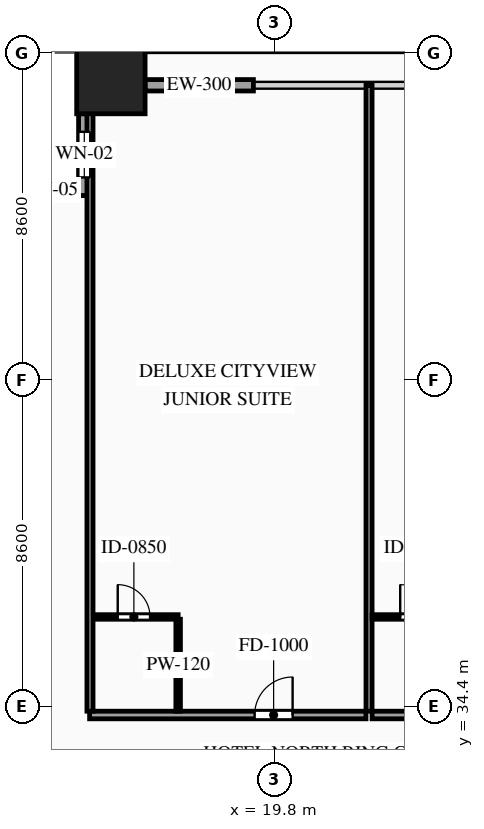
"""IFC4 building model, lengths in metres.
Left out: names, types, materials, properties, quantities, classifications, styles, units other than length and angle.
Written with IfcOpenShell. Run it as: python <this file> out.ifc"""

import sys

from ifc_helpers import new_model, si_unit, direction, frame, frame_2d, origin, origin_2d, place, context, subcontext, project, spatial, rectangle, hollow_rectangle, extrude, source, transform, mapped, element, fill, save


model = new_model("IFC4")
c1 = context("Model", 3, precision=1e-05, world=origin(), true_north=direction((0.0, 1.0)))
c2 = subcontext(c1, "Body", "Model", "MODEL_VIEW")
j1 = project(units=[si_unit("LENGTHUNIT", "METRE"), si_unit("PLANEANGLEUNIT", "RADIAN")], contexts=[c1])
p1 = place(None, origin())
s1 = spatial("IfcSite", under=j1, at=p1, CompositionType="ELEMENT")
p2 = place(p1, origin())
s2 = spatial("IfcBuilding", under=s1, at=p2, CompositionType="ELEMENT")
p3 = place(p2, frame((0.0, 0.0, 30.6)))
s3 = spatial("IfcBuildingStorey", under=s2, at=p3, CompositionType="ELEMENT", Elevation=30.6)
m1 = source(origin(), c2, "Body", "SweptSolid", [
    extrude(hollow_rectangle(XDim=1.8, YDim=1.8, WallThickness=0.08, at=origin_2d()), origin(), (0.0, 0.0, 1.0), 3.6),
])
p4 = place(p3, frame((15.5, 50.9, 0.0), z_axis=(0.0, 0.0, 1.0), x_axis=(1.0, 0.0, 0.0)))
e1 = element("IfcColumn", 1, at=p4, inside=s3, PredefinedType="COLUMN", context=c2, shape_type="MappedRepresentation", body=[
    mapped(m1, transform((0.0, 0.0, 0.0), scale=1.0)),
])
p5 = place(p3, frame((14.95, 48.0, 0.0), z_axis=(0.0, 0.0, 1.0), x_axis=(-1.0, 0.0, 0.0)))
e2 = element("IfcWall", 2, at=p5, inside=s3, PredefinedType="SOLIDWALL", context=c2, shape_type="SweptSolid", body=[
    extrude(rectangle(XDim=2.15, YDim=0.3, at=frame_2d((1.075, 0.0))), origin(), (0.0, 0.0, 1.0), 3.38),
])
p6 = place(p5, frame((0.625, 0.0, 0.85)))
e3 = element("IfcOpeningElement", 3, at=p6, cuts=e2, PredefinedType="OPENING", context=c2, shape_type="SweptSolid", body=[
    extrude(rectangle(XDim=0.9, YDim=1.5, at=frame_2d((0.45, 0.75))), frame((0.0, 0.165, 0.0), z_axis=(0.0, -1.0, 0.0), x_axis=(1.0, 0.0, 0.0)), (0.0, 0.0, 1.0), 0.33),
])
p7 = place(p3, frame((14.8, 50.0, 0.0), z_axis=(0.0, 0.0, 1.0), x_axis=(0.0, -1.0, 0.0)))
e4 = element("IfcWall", 4, at=p7, inside=s3, PredefinedType="SOLIDWALL", context=c2, shape_type="SweptSolid", body=[
    extrude(rectangle(XDim=2.15, YDim=0.3, at=frame_2d((1.075, 0.0))), origin(), (0.0, 0.0, 1.0), 3.38),
])
p8 = place(p7, frame((0.475, 0.0, 0.85)))
e5 = element("IfcOpeningElement", 5, at=p8, cuts=e4, PredefinedType="OPENING", context=c2, shape_type="SweptSolid", body=[
    extrude(rectangle(XDim=1.2, YDim=2.1, at=frame_2d((0.6, 1.05))), frame((0.0, 0.165, 0.0), z_axis=(0.0, -1.0, 0.0), x_axis=(1.0, 0.0, 0.0)), (0.0, 0.0, 1.0), 0.33),
])
m2 = source(origin(), c2, "Body", "SweptSolid", [
    extrude(rectangle(XDim=2.85, YDim=0.3, at=frame_2d((1.425, 0.0))), origin(), (0.0, 0.0, 1.0), 2.775),
])
p9 = place(p3, frame((16.4, 50.75, 0.0), z_axis=(0.0, 0.0, 1.0), x_axis=(1.0, 0.0, 0.0)))
e6 = element("IfcWall", 6, at=p9, inside=s3, PredefinedType="SOLIDWALL", context=c2, shape_type="MappedRepresentation", body=[
    mapped(m2, transform((0.0, 0.0, 0.0), scale=1.0)),
])
p10 = place(p3, frame((14.94, 34.18, 0.0), z_axis=(0.0, 0.0, 1.0), x_axis=(1.0, 0.0, 0.0)))
e7 = element("IfcWall", 7, at=p10, inside=s3, PredefinedType="PARTITIONING", context=c2, shape_type="SweptSolid", body=[
    extrude(rectangle(XDim=7.273, YDim=0.2, at=frame_2d((3.636, 0.0))), origin(), (0.0, 0.0, 1.0), 3.38),
])
p11 = place(p10, frame((4.342, 0.0, 0.0)))
e8 = element("IfcOpeningElement", 8, at=p11, cuts=e7, PredefinedType="OPENING", context=c2, shape_type="SweptSolid", body=[
    extrude(rectangle(XDim=1.0, YDim=2.2, at=frame_2d((0.5, 1.1))), frame((0.0, 0.115, 0.0), z_axis=(0.0, -1.0, 0.0), x_axis=(1.0, 0.0, 0.0)), (0.0, 0.0, 1.0), 0.23),
])
m3 = source(origin(), c2, "Body", "SweptSolid", [
    extrude(rectangle(XDim=16.47, YDim=0.16, at=frame_2d((8.235, 0.0))), origin(), (0.0, 0.0, 1.0), 3.38),
])
p12 = place(p3, frame((22.293, 34.28, 0.0), z_axis=(0.0, 0.0, 1.0), x_axis=(0.0, 1.0, 0.0)))
e9 = element("IfcWall", 9, at=p12, inside=s3, PredefinedType="PARTITIONING", context=c2, shape_type="MappedRepresentation", body=[
    mapped(m3, transform((0.0, 0.0, 0.0), scale=1.0)),
])
p13 = place(p3, frame((14.94, 36.76, 0.0), z_axis=(0.0, 0.0, 1.0), x_axis=(1.0, 0.0, 0.0)))
e10 = element("IfcWall", 10, at=p13, inside=s3, PredefinedType="PARTITIONING", context=c2, shape_type="SweptSolid", body=[
    extrude(rectangle(XDim=2.33, YDim=0.12, at=frame_2d((1.165, 0.0))), origin(), (0.0, 0.0, 1.0), 3.38),
])
p14 = place(p13, frame((0.74, 0.0, 0.0)))
e11 = element("IfcOpeningElement", 11, at=p14, cuts=e10, PredefinedType="OPENING", context=c2, shape_type="SweptSolid", body=[
    extrude(rectangle(XDim=0.85, YDim=2.1, at=frame_2d((0.425, 1.05))), frame((0.0, 0.075, 0.0), z_axis=(0.0, -1.0, 0.0), x_axis=(1.0, 0.0, 0.0)), (0.0, 0.0, 1.0), 0.15),
])
m4 = source(origin(), c2, "Body", "SweptSolid", [
    extrude(rectangle(XDim=2.42, YDim=0.12, at=frame_2d((1.21, 0.0))), origin(), (0.0, 0.0, 1.0), 3.38),
])
p15 = place(p3, frame((17.27, 34.28, 0.0), z_axis=(0.0, 0.0, 1.0), x_axis=(0.0, 1.0, 0.0)))
e12 = element("IfcWall", 12, at=p15, inside=s3, PredefinedType="PARTITIONING", context=c2, shape_type="MappedRepresentation", body=[
    mapped(m4, transform((0.0, 0.0, 0.0), scale=1.0)),
])
p16 = place(p3, frame((22.373, 34.18, 0.0), z_axis=(0.0, 0.0, 1.0), x_axis=(1.0, 0.0, 0.0)))
e13 = element("IfcWall", 13, at=p16, inside=s3, PredefinedType="PARTITIONING", context=c2, shape_type="SweptSolid", body=[
    extrude(rectangle(XDim=7.194, YDim=0.2, at=frame_2d((3.597, 0.0))), origin(), (0.0, 0.0, 1.0), 3.38),
])
p17 = place(p16, frame((4.302, 0.0, 0.0)))
e14 = element("IfcOpeningElement", 14, at=p17, cuts=e13, PredefinedType="OPENING", context=c2, shape_type="SweptSolid", body=[
    extrude(rectangle(XDim=1.0, YDim=2.2, at=frame_2d((0.5, 1.1))), frame((0.0, 0.115, 0.0), z_axis=(0.0, -1.0, 0.0), x_axis=(1.0, 0.0, 0.0)), (0.0, 0.0, 1.0), 0.23),
])
p18 = place(p3, frame((22.373, 36.76, 0.0), z_axis=(0.0, 0.0, 1.0), x_axis=(1.0, 0.0, 0.0)))
e15 = element("IfcWall", 15, at=p18, inside=s3, PredefinedType="PARTITIONING", context=c2, shape_type="SweptSolid", body=[
    extrude(rectangle(XDim=2.33, YDim=0.12, at=frame_2d((1.165, 0.0))), origin(), (0.0, 0.0, 1.0), 3.38),
])
p19 = place(p18, frame((0.74, 0.0, 0.0)))
e16 = element("IfcOpeningElement", 16, at=p19, cuts=e15, PredefinedType="OPENING", context=c2, shape_type="SweptSolid", body=[
    extrude(rectangle(XDim=0.85, YDim=2.1, at=frame_2d((0.425, 1.05))), frame((0.0, 0.075, 0.0), z_axis=(0.0, -1.0, 0.0), x_axis=(1.0, 0.0, 0.0)), (0.0, 0.0, 1.0), 0.15),
])
m5 = source(origin(), c2, "Body", "SweptSolid", [
    extrude(rectangle(XDim=16.32, YDim=0.16, at=frame_2d((8.16, 0.0))), origin(), (0.0, 0.0, 1.0), 3.38),
])
p20 = place(p3, frame((14.95, 34.28, 0.0), z_axis=(0.0, 0.0, 1.0), x_axis=(0.0, 1.0, 0.0)))
e17 = element("IfcWall", 17, at=p20, inside=s3, PredefinedType="PARTITIONING", context=c2, shape_type="MappedRepresentation", body=[
    mapped(m5, transform((0.0, 0.0, 0.0), scale=1.0)),
])
m6 = source(origin(), c2, "Body", "SweptSolid", [
    extrude(rectangle(XDim=0.9, YDim=1.5, at=frame_2d((0.45, 0.75))), frame((0.0, 0.03, 0.0), z_axis=(0.0, -1.0, 0.0), x_axis=(1.0, 0.0, 0.0)), (0.0, 0.0, 1.0), 0.06),
])
p21 = place(p6, origin())
e18 = element("IfcWindow", 18, at=p21, inside=s3, PartitioningType="SINGLE_PANEL", PredefinedType="WINDOW", context=c2, shape_type="MappedRepresentation", body=[
    mapped(m6, transform((0.0, 0.0, 0.0), scale=1.0)),
])
fill(e3, e18)
m7 = source(origin(), c2, "Body", "SweptSolid", [
    extrude(rectangle(XDim=1.2, YDim=2.1, at=frame_2d((0.6, 1.05))), frame((0.0, 0.03, 0.0), z_axis=(0.0, -1.0, 0.0), x_axis=(1.0, 0.0, 0.0)), (0.0, 0.0, 1.0), 0.06),
])
p22 = place(p8, origin())
e19 = element("IfcWindow", 19, at=p22, inside=s3, PartitioningType="SINGLE_PANEL", PredefinedType="WINDOW", context=c2, shape_type="MappedRepresentation", body=[
    mapped(m7, transform((0.0, 0.0, 0.0), scale=1.0)),
])
fill(e5, e19)
m8 = source(origin(), c2, "Body", "SweptSolid", [
    extrude(rectangle(XDim=1.0, YDim=2.2, at=frame_2d((0.5, 1.1))), frame((0.0, 0.025, 0.0), z_axis=(0.0, -1.0, 0.0), x_axis=(1.0, 0.0, 0.0)), (0.0, 0.0, 1.0), 0.05),
])
p23 = place(p11, origin())
e20 = element("IfcDoor", 20, at=p23, inside=s3, OperationType="SINGLE_SWING_RIGHT", PredefinedType="DOOR", context=c2, shape_type="MappedRepresentation", body=[
    mapped(m8, transform((0.0, 0.0, 0.0), scale=1.0)),
])
fill(e8, e20)
m9 = source(origin(), c2, "Body", "SweptSolid", [
    extrude(rectangle(XDim=0.85, YDim=2.1, at=frame_2d((0.425, 1.05))), frame((0.0, 0.025, 0.0), z_axis=(0.0, -1.0, 0.0), x_axis=(1.0, 0.0, 0.0)), (0.0, 0.0, 1.0), 0.05),
])
p24 = place(p14, origin())
e21 = element("IfcDoor", 21, at=p24, inside=s3, OperationType="SINGLE_SWING_LEFT", PredefinedType="DOOR", context=c2, shape_type="MappedRepresentation", body=[
    mapped(m9, transform((0.0, 0.0, 0.0), scale=1.0)),
])
fill(e11, e21)
p25 = place(p19, origin())
e22 = element("IfcDoor", 22, at=p25, inside=s3, OperationType="SINGLE_SWING_LEFT", PredefinedType="DOOR", context=c2, shape_type="MappedRepresentation", body=[
    mapped(m9, transform((0.0, 0.0, 0.0), scale=1.0)),
])
fill(e16, e22)
save(model, sys.argv[1])
